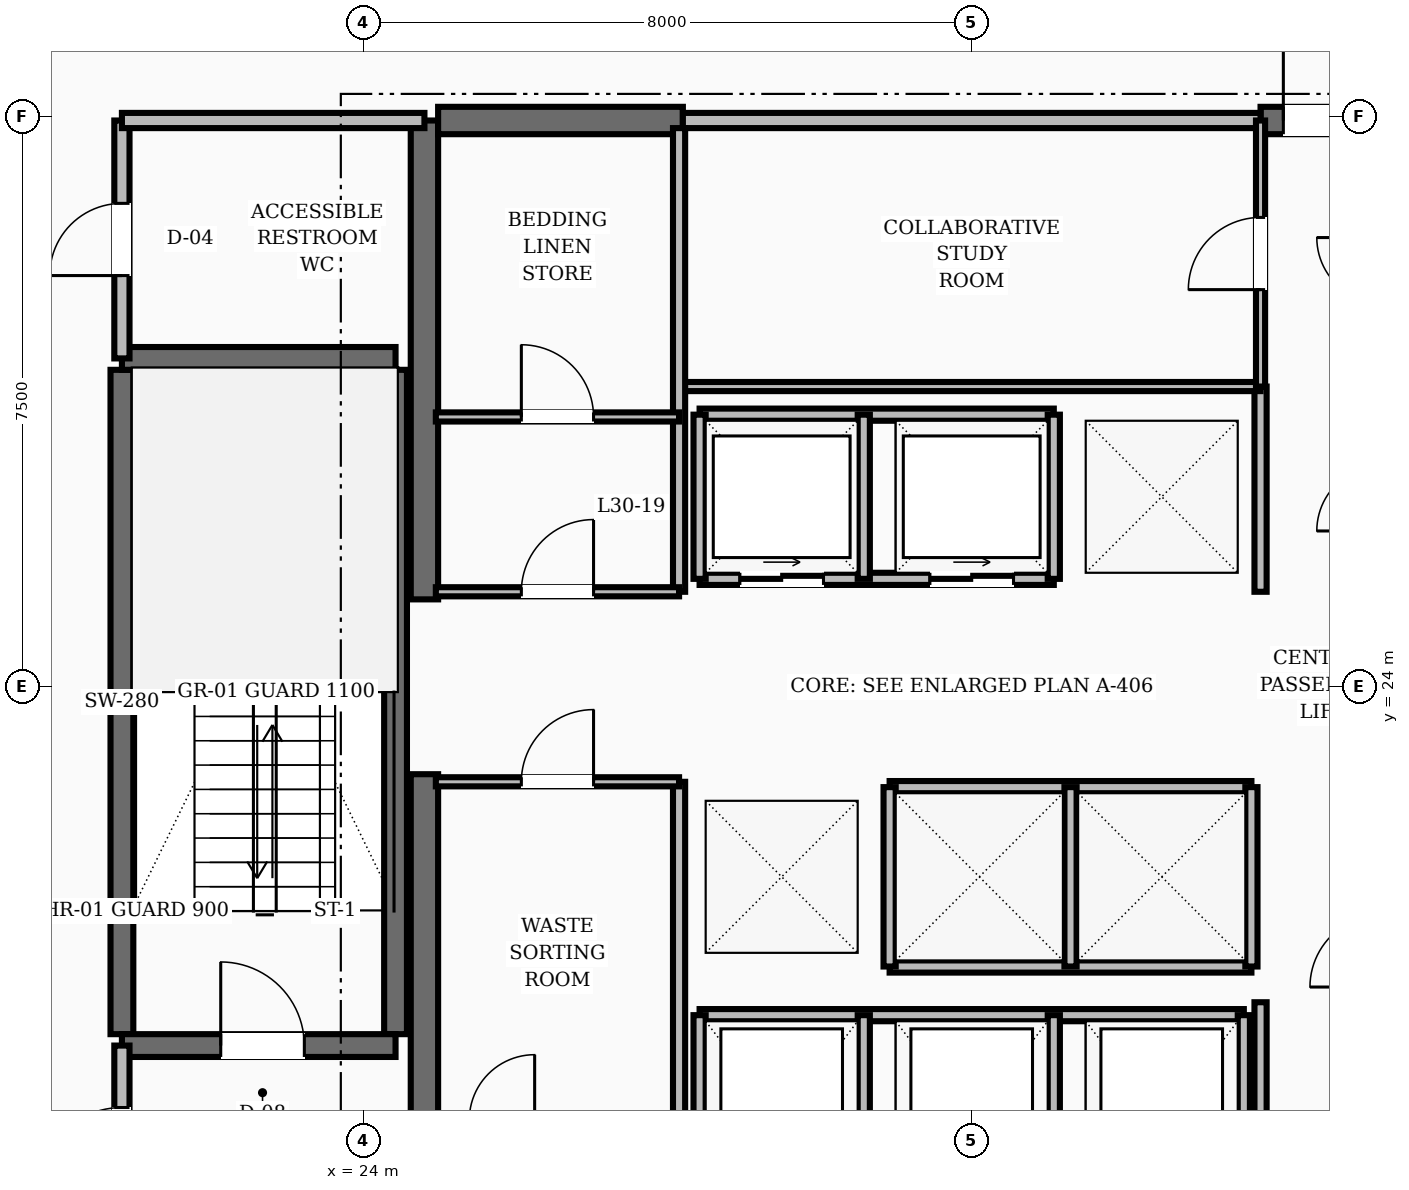
"""IFC4 building model, lengths in metres.
Left out: names, types, materials, properties, quantities, classifications, styles, units other than length and angle.
Written with IfcOpenShell. Run it as: python <this file> out.ifc"""

import sys

from ifc_helpers import new_model, si_unit, direction, frame, frame_2d, origin, place, context, subcontext, project, spatial, rectangle, extrude, element, fill, save


model = new_model("IFC4")
c1 = context("Model", 3, precision=1e-05, world=origin(), true_north=direction((0.0, 1.0)))
c2 = subcontext(c1, "Body", "Model", "MODEL_VIEW")
j1 = project(units=[si_unit("LENGTHUNIT", "METRE"), si_unit("PLANEANGLEUNIT", "RADIAN")], contexts=[c1])
p1 = place(None, origin())
s1 = spatial("IfcSite", under=j1, at=p1, CompositionType="ELEMENT")
p2 = place(p1, origin())
s2 = spatial("IfcBuilding", under=s1, at=p2, CompositionType="ELEMENT")
p3 = place(p2, frame((0.0, 0.0, 120.8)))
s3 = spatial("IfcBuildingStorey", under=s2, at=p3, CompositionType="ELEMENT", Elevation=120.8)
for number, where, z_axis, x_axis in (
    (1, (24.8, 16.55, 0.0), (0.0, 0.0, 1.0), (0.0, 1.0, 0.0)),
    (2, (24.8, 25.15, 0.0), (0.0, 0.0, 1.0), (0.0, 1.0, 0.0)),
):
    element("IfcWall", number, at=place(p3, frame(where, z_axis=z_axis, x_axis=x_axis)), inside=s3, PredefinedType="SHEAR", context=c2, shape_type="SweptSolid", body=[
        extrude(rectangle(XDim=6.3, YDim=0.36, at=frame_2d((3.15, 0.0))), origin(), (0.0, 0.0, 1.0), 3.6),
    ])
p4 = place(p3, frame((24.98, 31.45, 0.0), z_axis=(0.0, 0.0, 1.0), x_axis=(1.0, 0.0, 0.0)))
e3 = element("IfcWall", 3, at=p4, inside=s3, PredefinedType="SHEAR", context=c2, shape_type="SweptSolid", body=[
    extrude(rectangle(XDim=3.22, YDim=0.36, at=frame_2d((1.61, 0.0))), origin(), (0.0, 0.0, 1.0), 3.6),
])
p5 = place(p3, frame((35.8, 31.45, 0.0), z_axis=(0.0, 0.0, 1.0), x_axis=(1.0, 0.0, 0.0)))
e4 = element("IfcWall", 4, at=p5, inside=s3, PredefinedType="SHEAR", context=c2, shape_type="SweptSolid", body=[
    extrude(rectangle(XDim=3.22, YDim=0.36, at=frame_2d((1.61, 0.0))), origin(), (0.0, 0.0, 1.0), 3.6),
])
p6 = place(p5, frame((0.3, 0.0, 0.0)))
e5 = element("IfcOpeningElement", 5, at=p6, cuts=e4, PredefinedType="OPENING", context=c2, shape_type="SweptSolid", body=[
    extrude(rectangle(XDim=1.1, YDim=2.1, at=frame_2d((0.55, 1.05))), frame((0.0, 0.19, 0.0), z_axis=(0.0, -1.0, 0.0), x_axis=(1.0, 0.0, 0.0)), (0.0, 0.0, 1.0), 0.38),
])
for number, where, z_axis, x_axis in (
    (6, (20.82, 19.43, 0.0), (0.0, 0.0, 1.0), (0.0, 1.0, 0.0)),
    (7, (24.42, 19.43, 0.0), (0.0, 0.0, 1.0), (0.0, 1.0, 0.0)),
):
    element("IfcWall", number, at=place(p3, frame(where, z_axis=z_axis, x_axis=x_axis)), inside=s3, PredefinedType="SHEAR", context=c2, shape_type="SweptSolid", body=[
        extrude(rectangle(XDim=8.74, YDim=0.3, at=frame_2d((4.37, 0.0))), origin(), (0.0, 0.0, 1.0), 3.6),
    ])
p7 = place(p3, frame((20.82, 19.28, 0.0), z_axis=(0.0, 0.0, 1.0), x_axis=(1.0, 0.0, 0.0)))
e8 = element("IfcWall", 8, at=p7, inside=s3, PredefinedType="SHEAR", context=c2, shape_type="SweptSolid", body=[
    extrude(rectangle(XDim=3.6, YDim=0.3, at=frame_2d((1.8, 0.0))), origin(), (0.0, 0.0, 1.0), 3.6),
])
p8 = place(p7, frame((1.3, 0.0, 0.0)))
e9 = element("IfcOpeningElement", 9, at=p8, cuts=e8, PredefinedType="OPENING", context=c2, shape_type="SweptSolid", body=[
    extrude(rectangle(XDim=1.1, YDim=2.1, at=frame_2d((0.55, 1.05))), frame((0.0, 0.16, 0.0), z_axis=(0.0, -1.0, 0.0), x_axis=(1.0, 0.0, 0.0)), (0.0, 0.0, 1.0), 0.32),
])
p9 = place(p3, frame((20.82, 28.32, 0.0), z_axis=(0.0, 0.0, 1.0), x_axis=(1.0, 0.0, 0.0)))
e10 = element("IfcWall", 10, at=p9, inside=s3, PredefinedType="SHEAR", context=c2, shape_type="SweptSolid", body=[
    extrude(rectangle(XDim=3.6, YDim=0.3, at=frame_2d((1.8, 0.0))), origin(), (0.0, 0.0, 1.0), 3.6),
])
p10 = place(p3, frame((20.82, 16.55, 0.0), z_axis=(0.0, 0.0, 1.0), x_axis=(0.0, 1.0, 0.0)))
e11 = element("IfcWall", 11, at=p10, inside=s3, PredefinedType="SOLIDWALL", context=c2, shape_type="SweptSolid", body=[
    extrude(rectangle(XDim=2.73, YDim=0.2, at=frame_2d((1.365, 0.0))), origin(), (0.0, 0.0, 1.0), 2.8),
])
p11 = place(p10, frame((0.815, 0.0, 0.0)))
e12 = element("IfcOpeningElement", 12, at=p11, cuts=e11, PredefinedType="OPENING", context=c2, shape_type="SweptSolid", body=[
    extrude(rectangle(XDim=1.1, YDim=2.1, at=frame_2d((0.55, 1.05))), frame((0.0, 0.11, 0.0), z_axis=(0.0, -1.0, 0.0), x_axis=(1.0, 0.0, 0.0)), (0.0, 0.0, 1.0), 0.22),
])
p12 = place(p3, frame((20.82, 28.32, 0.0), z_axis=(0.0, 0.0, 1.0), x_axis=(0.0, 1.0, 0.0)))
e13 = element("IfcWall", 13, at=p12, inside=s3, PredefinedType="SOLIDWALL", context=c2, shape_type="SweptSolid", body=[
    extrude(rectangle(XDim=3.13, YDim=0.2, at=frame_2d((1.565, 0.0))), origin(), (0.0, 0.0, 1.0), 2.8),
])
p13 = place(p12, frame((1.09, 0.0, 0.0)))
e14 = element("IfcOpeningElement", 14, at=p13, cuts=e13, PredefinedType="OPENING", context=c2, shape_type="SweptSolid", body=[
    extrude(rectangle(XDim=0.95, YDim=2.1, at=frame_2d((0.475, 1.05))), frame((0.0, 0.11, 0.0), z_axis=(0.0, -1.0, 0.0), x_axis=(1.0, 0.0, 0.0)), (0.0, 0.0, 1.0), 0.22),
])
p14 = place(p3, frame((20.82, 31.45, 0.0), z_axis=(0.0, 0.0, 1.0), x_axis=(1.0, 0.0, 0.0)))
e15 = element("IfcWall", 15, at=p14, inside=s3, PredefinedType="SOLIDWALL", context=c2, shape_type="SweptSolid", body=[
    extrude(rectangle(XDim=3.98, YDim=0.2, at=frame_2d((1.99, 0.0))), origin(), (0.0, 0.0, 1.0), 2.8),
])
p15 = place(p3, frame((35.8, 16.55, 0.0), z_axis=(0.0, 0.0, 1.0), x_axis=(0.0, 1.0, 0.0)))
e16 = element("IfcWall", 16, at=p15, inside=s3, PredefinedType="SOLIDWALL", context=c2, shape_type="SweptSolid", body=[
    extrude(rectangle(XDim=3.3, YDim=0.16, at=frame_2d((1.65, 0.0))), origin(), (0.0, 0.0, 1.0), 2.8),
])
p16 = place(p3, frame((35.8, 25.25, 0.0), z_axis=(0.0, 0.0, 1.0), x_axis=(0.0, 1.0, 0.0)))
e17 = element("IfcWall", 17, at=p16, inside=s3, PredefinedType="SOLIDWALL", context=c2, shape_type="SweptSolid", body=[
    extrude(rectangle(XDim=2.7, YDim=0.16, at=frame_2d((1.35, 0.0))), origin(), (0.0, 0.0, 1.0), 2.8),
])
p17 = place(p3, frame((28.42, 25.42, 0.0), z_axis=(0.0, 0.0, 1.0), x_axis=(1.0, 0.0, 0.0)))
e18 = element("IfcWall", 18, at=p17, inside=s3, PredefinedType="SOLIDWALL", context=c2, shape_type="SweptSolid", body=[
    extrude(rectangle(XDim=4.66, YDim=0.16, at=frame_2d((2.33, 0.0))), origin(), (0.0, 0.0, 1.0), 2.8),
])
p18 = place(p17, frame((0.53, 0.0, 0.0)))
e19 = element("IfcOpeningElement", 19, at=p18, cuts=e18, PredefinedType="OPENING", context=c2, shape_type="SweptSolid", body=[
    extrude(rectangle(XDim=1.1, YDim=2.15, at=frame_2d((0.55, 1.075))), frame((0.0, 0.09, 0.0), z_axis=(0.0, -1.0, 0.0), x_axis=(1.0, 0.0, 0.0)), (0.0, 0.0, 1.0), 0.18),
])
p19 = place(p17, frame((3.03, 0.0, 0.0)))
e20 = element("IfcOpeningElement", 20, at=p19, cuts=e18, PredefinedType="OPENING", context=c2, shape_type="SweptSolid", body=[
    extrude(rectangle(XDim=1.1, YDim=2.15, at=frame_2d((0.55, 1.075))), frame((0.0, 0.09, 0.0), z_axis=(0.0, -1.0, 0.0), x_axis=(1.0, 0.0, 0.0)), (0.0, 0.0, 1.0), 0.18),
])
p20 = place(p3, frame((28.42, 27.58, 0.0), z_axis=(0.0, 0.0, 1.0), x_axis=(1.0, 0.0, 0.0)))
e21 = element("IfcWall", 21, at=p20, inside=s3, PredefinedType="SOLIDWALL", context=c2, shape_type="SweptSolid", body=[
    extrude(rectangle(XDim=4.66, YDim=0.16, at=frame_2d((2.33, 0.0))), origin(), (0.0, 0.0, 1.0), 2.8),
])
for number, where, z_axis, x_axis in (
    (22, (28.42, 25.42, 0.0), (0.0, 0.0, 1.0), (0.0, 1.0, 0.0)),
    (23, (30.58, 25.42, 0.0), (0.0, 0.0, 1.0), (0.0, 1.0, 0.0)),
    (24, (33.08, 25.42, 0.0), (0.0, 0.0, 1.0), (0.0, 1.0, 0.0)),
):
    element("IfcWall", number, at=place(p3, frame(where, z_axis=z_axis, x_axis=x_axis)), inside=s3, PredefinedType="SOLIDWALL", context=c2, shape_type="SweptSolid", body=[
        extrude(rectangle(XDim=2.16, YDim=0.16, at=frame_2d((1.08, 0.0))), origin(), (0.0, 0.0, 1.0), 2.8),
    ])
for number, where, z_axis, x_axis in (
    (25, (30.92, 22.68, 0.0), (0.0, 0.0, 1.0), (1.0, 0.0, 0.0)),
    (26, (30.92, 20.32, 0.0), (0.0, 0.0, 1.0), (1.0, 0.0, 0.0)),
):
    element("IfcWall", number, at=place(p3, frame(where, z_axis=z_axis, x_axis=x_axis)), inside=s3, PredefinedType="SOLIDWALL", context=c2, shape_type="SweptSolid", body=[
        extrude(rectangle(XDim=4.76, YDim=0.16, at=frame_2d((2.38, 0.0))), origin(), (0.0, 0.0, 1.0), 2.8),
    ])
for number, where, z_axis, x_axis in (
    (27, (30.92, 20.32, 0.0), (0.0, 0.0, 1.0), (0.0, 1.0, 0.0)),
    (28, (33.3, 20.32, 0.0), (0.0, 0.0, 1.0), (0.0, 1.0, 0.0)),
    (29, (35.68, 20.32, 0.0), (0.0, 0.0, 1.0), (0.0, 1.0, 0.0)),
):
    element("IfcWall", number, at=place(p3, frame(where, z_axis=z_axis, x_axis=x_axis)), inside=s3, PredefinedType="SOLIDWALL", context=c2, shape_type="SweptSolid", body=[
        extrude(rectangle(XDim=2.36, YDim=0.16, at=frame_2d((1.18, 0.0))), origin(), (0.0, 0.0, 1.0), 2.8),
    ])
p21 = place(p3, frame((28.42, 19.68, 0.0), z_axis=(0.0, 0.0, 1.0), x_axis=(1.0, 0.0, 0.0)))
e30 = element("IfcWall", 30, at=p21, inside=s3, PredefinedType="SOLIDWALL", context=c2, shape_type="SweptSolid", body=[
    extrude(rectangle(XDim=7.16, YDim=0.16, at=frame_2d((3.58, 0.0))), origin(), (0.0, 0.0, 1.0), 2.8),
])
for number, where, z_axis, x_axis in (
    (31, (28.42, 16.92, 0.0), (0.0, 0.0, 1.0), (0.0, 1.0, 0.0)),
    (32, (30.58, 16.92, 0.0), (0.0, 0.0, 1.0), (0.0, 1.0, 0.0)),
    (33, (33.08, 16.92, 0.0), (0.0, 0.0, 1.0), (0.0, 1.0, 0.0)),
    (34, (35.58, 16.92, 0.0), (0.0, 0.0, 1.0), (0.0, 1.0, 0.0)),
):
    element("IfcWall", number, at=place(p3, frame(where, z_axis=z_axis, x_axis=x_axis)), inside=s3, PredefinedType="SOLIDWALL", context=c2, shape_type="SweptSolid", body=[
        extrude(rectangle(XDim=2.76, YDim=0.16, at=frame_2d((1.38, 0.0))), origin(), (0.0, 0.0, 1.0), 2.8),
    ])
p22 = place(p3, frame((28.2, 31.45, 0.0), z_axis=(0.0, 0.0, 1.0), x_axis=(1.0, 0.0, 0.0)))
e35 = element("IfcWall", 35, at=p22, inside=s3, PredefinedType="SOLIDWALL", context=c2, shape_type="SweptSolid", body=[
    extrude(rectangle(XDim=7.6, YDim=0.2, at=frame_2d((3.8, 0.0))), origin(), (0.0, 0.0, 1.0), 2.8),
])
p23 = place(p3, frame((28.2, 27.95, 0.0), z_axis=(0.0, 0.0, 1.0), x_axis=(1.0, 0.0, 0.0)))
e36 = element("IfcWall", 36, at=p23, inside=s3, PredefinedType="PARTITIONING", context=c2, shape_type="SweptSolid", body=[
    extrude(rectangle(XDim=7.6, YDim=0.12, at=frame_2d((3.8, 0.0))), origin(), (0.0, 0.0, 1.0), 2.8),
])
p24 = place(p3, frame((35.8, 27.95, 0.0), z_axis=(0.0, 0.0, 1.0), x_axis=(0.0, 1.0, 0.0)))
e37 = element("IfcWall", 37, at=p24, inside=s3, PredefinedType="PARTITIONING", context=c2, shape_type="SweptSolid", body=[
    extrude(rectangle(XDim=3.5, YDim=0.12, at=frame_2d((1.75, 0.0))), origin(), (0.0, 0.0, 1.0), 2.8),
])
p25 = place(p24, frame((1.275, 0.0, 0.0)))
e38 = element("IfcOpeningElement", 38, at=p25, cuts=e37, PredefinedType="OPENING", context=c2, shape_type="SweptSolid", body=[
    extrude(rectangle(XDim=0.95, YDim=2.1, at=frame_2d((0.475, 1.05))), frame((0.0, 0.07, 0.0), z_axis=(0.0, -1.0, 0.0), x_axis=(1.0, 0.0, 0.0)), (0.0, 0.0, 1.0), 0.14),
])
p26 = place(p3, frame((28.15, 16.7, 0.0), z_axis=(0.0, 0.0, 1.0), x_axis=(0.0, 1.0, 0.0)))
e39 = element("IfcWall", 39, at=p26, inside=s3, PredefinedType="SOLIDWALL", context=c2, shape_type="SweptSolid", body=[
    extrude(rectangle(XDim=6.05, YDim=0.16, at=frame_2d((3.025, 0.0))), origin(), (0.0, 0.0, 1.0), 2.8),
])
p27 = place(p3, frame((28.15, 25.25, 0.0), z_axis=(0.0, 0.0, 1.0), x_axis=(0.0, 1.0, 0.0)))
e40 = element("IfcWall", 40, at=p27, inside=s3, PredefinedType="SOLIDWALL", context=c2, shape_type="SweptSolid", body=[
    extrude(rectangle(XDim=6.1, YDim=0.16, at=frame_2d((3.05, 0.0))), origin(), (0.0, 0.0, 1.0), 2.8),
])
p28 = place(p3, frame((24.95, 25.25, 0.0), z_axis=(0.0, 0.0, 1.0), x_axis=(1.0, 0.0, 0.0)))
e41 = element("IfcWall", 41, at=p28, inside=s3, PredefinedType="PARTITIONING", context=c2, shape_type="SweptSolid", body=[
    extrude(rectangle(XDim=3.2, YDim=0.12, at=frame_2d((1.6, 0.0))), origin(), (0.0, 0.0, 1.0), 2.8),
])
p29 = place(p28, frame((1.125, 0.0, 0.0)))
e42 = element("IfcOpeningElement", 42, at=p29, cuts=e41, PredefinedType="OPENING", context=c2, shape_type="SweptSolid", body=[
    extrude(rectangle(XDim=0.95, YDim=2.1, at=frame_2d((0.475, 1.05))), frame((0.0, 0.07, 0.0), z_axis=(0.0, -1.0, 0.0), x_axis=(1.0, 0.0, 0.0)), (0.0, 0.0, 1.0), 0.14),
])
p30 = place(p3, frame((24.95, 22.75, 0.0), z_axis=(0.0, 0.0, 1.0), x_axis=(1.0, 0.0, 0.0)))
e43 = element("IfcWall", 43, at=p30, inside=s3, PredefinedType="PARTITIONING", context=c2, shape_type="SweptSolid", body=[
    extrude(rectangle(XDim=3.2, YDim=0.12, at=frame_2d((1.6, 0.0))), origin(), (0.0, 0.0, 1.0), 2.8),
])
p31 = place(p30, frame((1.125, 0.0, 0.0)))
e44 = element("IfcOpeningElement", 44, at=p31, cuts=e43, PredefinedType="OPENING", context=c2, shape_type="SweptSolid", body=[
    extrude(rectangle(XDim=0.95, YDim=2.1, at=frame_2d((0.475, 1.05))), frame((0.0, 0.07, 0.0), z_axis=(0.0, -1.0, 0.0), x_axis=(1.0, 0.0, 0.0)), (0.0, 0.0, 1.0), 0.14),
])
p32 = place(p3, frame((24.95, 27.55, 0.0), z_axis=(0.0, 0.0, 1.0), x_axis=(1.0, 0.0, 0.0)))
e45 = element("IfcWall", 45, at=p32, inside=s3, PredefinedType="PARTITIONING", context=c2, shape_type="SweptSolid", body=[
    extrude(rectangle(XDim=3.2, YDim=0.12, at=frame_2d((1.6, 0.0))), origin(), (0.0, 0.0, 1.0), 2.8),
])
p33 = place(p32, frame((1.125, 0.0, 0.0)))
e46 = element("IfcOpeningElement", 46, at=p33, cuts=e45, PredefinedType="OPENING", context=c2, shape_type="SweptSolid", body=[
    extrude(rectangle(XDim=0.95, YDim=2.1, at=frame_2d((0.475, 1.05))), frame((0.0, 0.07, 0.0), z_axis=(0.0, -1.0, 0.0), x_axis=(1.0, 0.0, 0.0)), (0.0, 0.0, 1.0), 0.14),
])
p34 = place(p8, origin())
e47 = element("IfcDoor", 47, at=p34, inside=s3, OperationType="SINGLE_SWING_LEFT", PredefinedType="DOOR", context=c2, shape_type="SweptSolid", body=[
    extrude(rectangle(XDim=1.1, YDim=2.1, at=frame_2d((0.55, 1.05))), frame((0.0, 0.025, 0.0), z_axis=(0.0, -1.0, 0.0), x_axis=(1.0, 0.0, 0.0)), (0.0, 0.0, 1.0), 0.05),
])
fill(e9, e47)
p35 = place(p11, origin())
e48 = element("IfcDoor", 48, at=p35, inside=s3, OperationType="SINGLE_SWING_LEFT", PredefinedType="DOOR", context=c2, shape_type="SweptSolid", body=[
    extrude(rectangle(XDim=1.1, YDim=2.1, at=frame_2d((0.55, 1.05))), frame((0.0, 0.025, 0.0), z_axis=(0.0, -1.0, 0.0), x_axis=(1.0, 0.0, 0.0)), (0.0, 0.0, 1.0), 0.05),
])
fill(e12, e48)
p36 = place(p13, origin())
e49 = element("IfcDoor", 49, at=p36, inside=s3, OperationType="SINGLE_SWING_LEFT", PredefinedType="DOOR", context=c2, shape_type="SweptSolid", body=[
    extrude(rectangle(XDim=0.95, YDim=2.1, at=frame_2d((0.475, 1.05))), frame((0.0, 0.025, 0.0), z_axis=(0.0, -1.0, 0.0), x_axis=(1.0, 0.0, 0.0)), (0.0, 0.0, 1.0), 0.05),
])
fill(e14, e49)
p37 = place(p6, origin())
e50 = element("IfcDoor", 50, at=p37, inside=s3, OperationType="SINGLE_SWING_LEFT", PredefinedType="DOOR", context=c2, shape_type="SweptSolid", body=[
    extrude(rectangle(XDim=1.1, YDim=2.1, at=frame_2d((0.55, 1.05))), frame((0.0, 0.025, 0.0), z_axis=(0.0, -1.0, 0.0), x_axis=(1.0, 0.0, 0.0)), (0.0, 0.0, 1.0), 0.05),
])
fill(e5, e50)
p38 = place(p18, origin())
e51 = element("IfcDoor", 51, at=p38, inside=s3, OperationType="SLIDING_TO_RIGHT", PredefinedType="DOOR", context=c2, shape_type="SweptSolid", body=[
    extrude(rectangle(XDim=1.1, YDim=2.15, at=frame_2d((0.55, 1.075))), frame((0.0, 0.025, 0.0), z_axis=(0.0, -1.0, 0.0), x_axis=(1.0, 0.0, 0.0)), (0.0, 0.0, 1.0), 0.05),
])
fill(e19, e51)
p39 = place(p19, origin())
e52 = element("IfcDoor", 52, at=p39, inside=s3, OperationType="SLIDING_TO_RIGHT", PredefinedType="DOOR", context=c2, shape_type="SweptSolid", body=[
    extrude(rectangle(XDim=1.1, YDim=2.15, at=frame_2d((0.55, 1.075))), frame((0.0, 0.025, 0.0), z_axis=(0.0, -1.0, 0.0), x_axis=(1.0, 0.0, 0.0)), (0.0, 0.0, 1.0), 0.05),
])
fill(e20, e52)
p40 = place(p25, origin())
e53 = element("IfcDoor", 53, at=p40, inside=s3, OperationType="SINGLE_SWING_LEFT", PredefinedType="DOOR", context=c2, shape_type="SweptSolid", body=[
    extrude(rectangle(XDim=0.95, YDim=2.1, at=frame_2d((0.475, 1.05))), frame((0.0, 0.025, 0.0), z_axis=(0.0, -1.0, 0.0), x_axis=(1.0, 0.0, 0.0)), (0.0, 0.0, 1.0), 0.05),
])
fill(e38, e53)
p41 = place(p29, origin())
e54 = element("IfcDoor", 54, at=p41, inside=s3, OperationType="SINGLE_SWING_RIGHT", PredefinedType="DOOR", context=c2, shape_type="SweptSolid", body=[
    extrude(rectangle(XDim=0.95, YDim=2.1, at=frame_2d((0.475, 1.05))), frame((0.0, 0.025, 0.0), z_axis=(0.0, -1.0, 0.0), x_axis=(1.0, 0.0, 0.0)), (0.0, 0.0, 1.0), 0.05),
])
fill(e42, e54)
p42 = place(p33, origin())
e55 = element("IfcDoor", 55, at=p42, inside=s3, OperationType="SINGLE_SWING_LEFT", PredefinedType="DOOR", context=c2, shape_type="SweptSolid", body=[
    extrude(rectangle(XDim=0.95, YDim=2.1, at=frame_2d((0.475, 1.05))), frame((0.0, 0.025, 0.0), z_axis=(0.0, -1.0, 0.0), x_axis=(1.0, 0.0, 0.0)), (0.0, 0.0, 1.0), 0.05),
])
fill(e46, e55)
p43 = place(p31, origin())
e56 = element("IfcDoor", 56, at=p43, inside=s3, OperationType="SINGLE_SWING_RIGHT", PredefinedType="DOOR", context=c2, shape_type="SweptSolid", body=[
    extrude(rectangle(XDim=0.95, YDim=2.1, at=frame_2d((0.475, 1.05))), frame((0.0, 0.025, 0.0), z_axis=(0.0, -1.0, 0.0), x_axis=(1.0, 0.0, 0.0)), (0.0, 0.0, 1.0), 0.05),
])
fill(e44, e56)
save(model, sys.argv[1])
